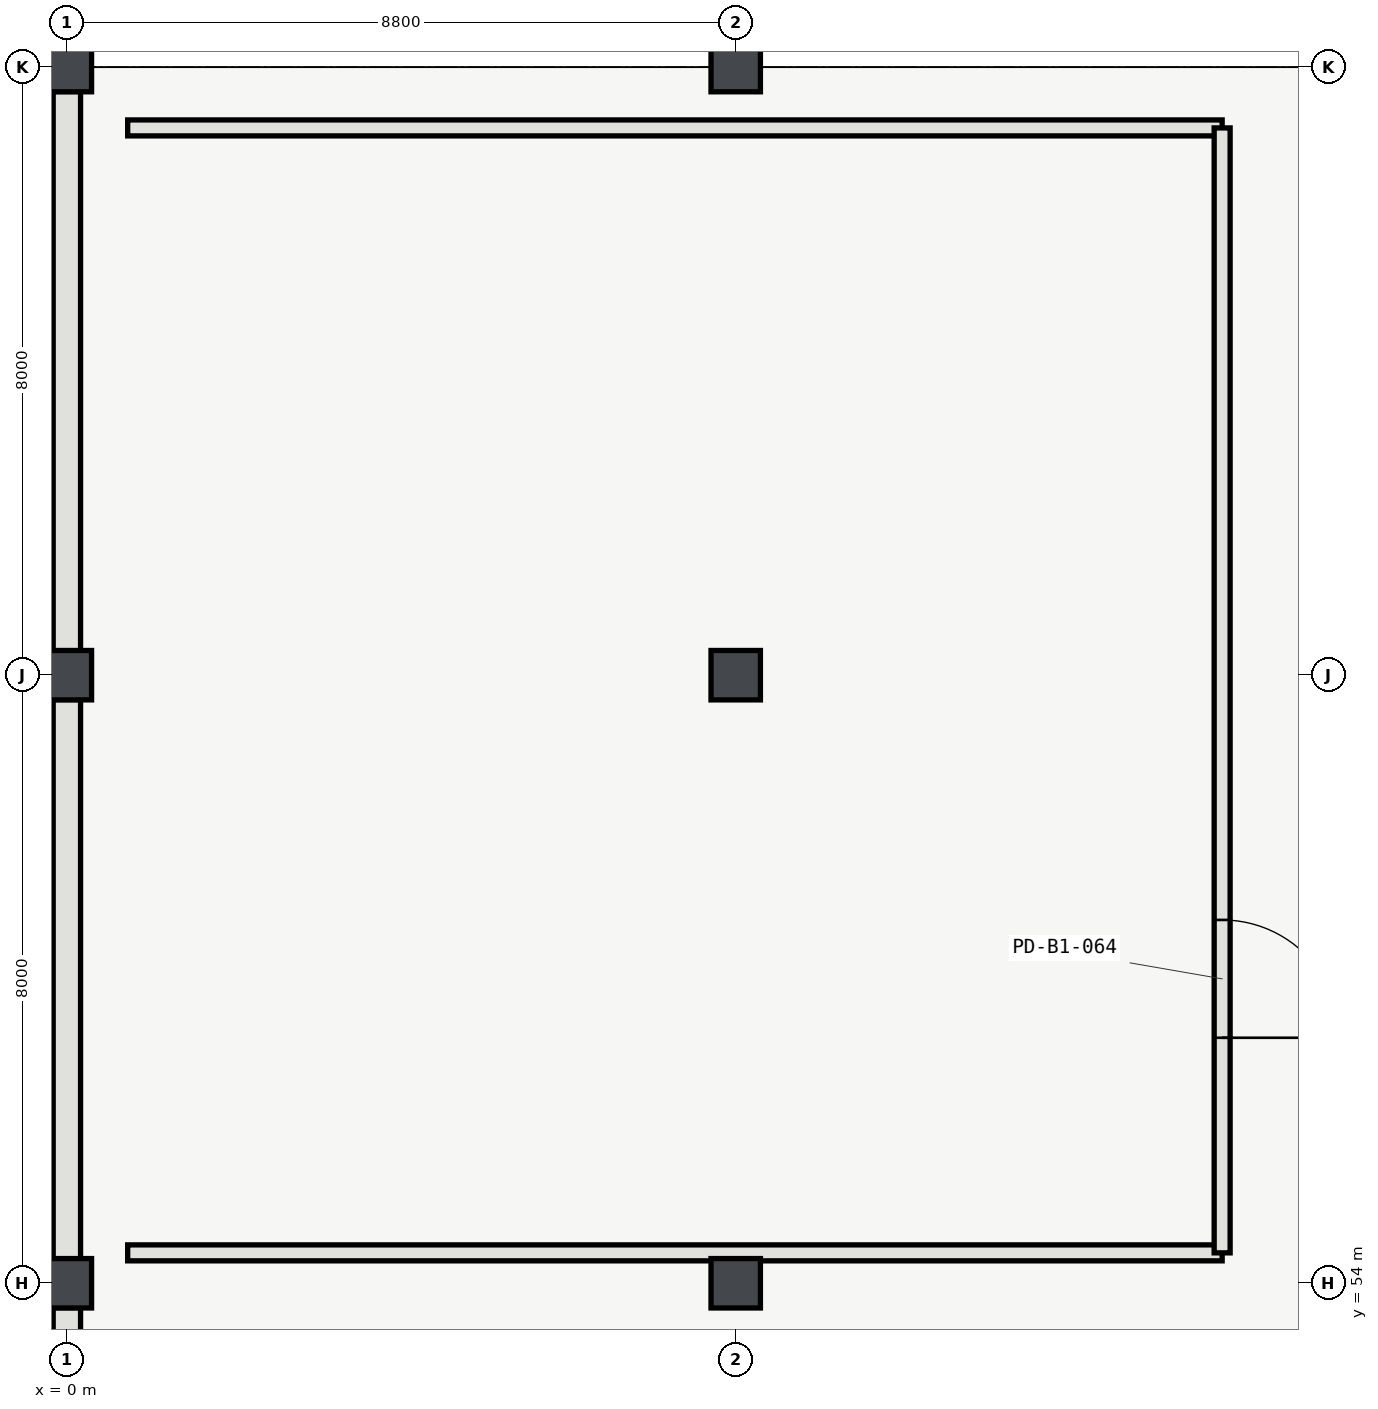
"""IFC4 building model, lengths in metres.
Left out: names, types, materials, properties, quantities, classifications, styles, units other than length and angle.
Written with IfcOpenShell. Run it as: python <this file> out.ifc"""

import sys

from ifc_helpers import new_model, si_unit, direction, frame, frame_2d, origin, origin_2d, place, context, subcontext, project, spatial, rectangle, hollow_rectangle, extrude, element, fill, save


model = new_model("IFC4")
c1 = context("Model", 3, precision=1e-05, world=origin(), true_north=direction((0.0, 1.0)))
c2 = subcontext(c1, "Body", "Model", "MODEL_VIEW")
j1 = project(units=[si_unit("LENGTHUNIT", "METRE"), si_unit("PLANEANGLEUNIT", "RADIAN")], contexts=[c1])
p1 = place(None, origin())
s1 = spatial("IfcSite", under=j1, at=p1, CompositionType="ELEMENT")
p2 = place(p1, origin())
s2 = spatial("IfcBuilding", under=s1, at=p2, CompositionType="ELEMENT")
p3 = place(p2, frame((0.0, 0.0, -4.8)))
s3 = spatial("IfcBuildingStorey", under=s2, at=p3, CompositionType="ELEMENT", Elevation=-4.8)
for number, where, z_axis, x_axis in (
    (1, (0.0, 54.0, 0.0), (0.0, 0.0, 1.0), (1.0, 0.0, 0.0)),
    (2, (0.0, 62.0, 0.0), (0.0, 0.0, 1.0), (1.0, 0.0, 0.0)),
    (3, (0.0, 70.0, 0.0), (0.0, 0.0, 1.0), (1.0, 0.0, 0.0)),
    (4, (8.8, 54.0, 0.0), (0.0, 0.0, 1.0), (1.0, 0.0, 0.0)),
    (5, (8.8, 62.0, 0.0), (0.0, 0.0, 1.0), (1.0, 0.0, 0.0)),
    (6, (8.8, 70.0, 0.0), (0.0, 0.0, 1.0), (1.0, 0.0, 0.0)),
):
    element("IfcColumn", number, at=place(p3, frame(where, z_axis=z_axis, x_axis=x_axis)), inside=s3, PredefinedType="COLUMN", context=c2, shape_type="SweptSolid", body=[
        extrude(hollow_rectangle(XDim=0.65, YDim=0.65, WallThickness=0.026, InnerFilletRadius=0.026, OuterFilletRadius=0.052, at=origin_2d()), origin(), (0.0, 0.0, 1.0), 4.8),
    ])
for number, where, z_axis, x_axis in (
    (7, (0.0, 53.679, 0.0), (0.0, 0.0, 1.0), (0.0, -1.0, 0.0)),
    (8, (0.0, 61.679, 0.0), (0.0, 0.0, 1.0), (0.0, -1.0, 0.0)),
    (9, (0.0, 69.679, 0.0), (0.0, 0.0, 1.0), (0.0, -1.0, 0.0)),
):
    element("IfcWall", number, at=place(p3, frame(where, z_axis=z_axis, x_axis=x_axis)), inside=s3, PredefinedType="USERDEFINED", context=c2, shape_type="SweptSolid", body=[
        extrude(rectangle(XDim=7.358, YDim=0.36, at=frame_2d((3.679, 0.0))), origin(), (0.0, 0.0, 1.0), 3.883),
    ])
for number, where, z_axis, x_axis in (
    (10, (0.8, 54.4, 0.0), (0.0, 0.0, 1.0), (1.0, 0.0, 0.0)),
    (11, (15.2, 69.2, 0.0), (0.0, 0.0, 1.0), (-1.0, 0.0, 0.0)),
):
    element("IfcWall", number, at=place(p3, frame(where, z_axis=z_axis, x_axis=x_axis)), inside=s3, PredefinedType="PARTITIONING", context=c2, shape_type="SweptSolid", body=[
        extrude(rectangle(XDim=14.4, YDim=0.21, at=frame_2d((7.2, 0.0))), origin(), (0.0, 0.0, 1.0), 4.52),
    ])
p4 = place(p3, frame((15.2, 54.4, 0.0), z_axis=(0.0, 0.0, 1.0), x_axis=(0.0, 1.0, 0.0)))
e12 = element("IfcWall", 12, at=p4, inside=s3, PredefinedType="PARTITIONING", context=c2, shape_type="SweptSolid", body=[
    extrude(rectangle(XDim=14.8, YDim=0.21, at=frame_2d((7.4, 0.0))), origin(), (0.0, 0.0, 1.0), 4.52),
])
p5 = place(p4, frame((2.83, 0.0, 0.0)))
e13 = element("IfcOpeningElement", 13, at=p5, cuts=e12, PredefinedType="OPENING", context=c2, shape_type="SweptSolid", body=[
    extrude(rectangle(XDim=1.55, YDim=2.25, at=frame_2d((0.775, 1.125))), frame((0.0, 0.115, 0.0), z_axis=(0.0, -1.0, 0.0), x_axis=(1.0, 0.0, 0.0)), (0.0, 0.0, 1.0), 0.23),
])
p6 = place(p5, origin())
e14 = element("IfcDoor", 14, at=p6, inside=s3, OperationType="DOUBLE_DOOR_SINGLE_SWING", PredefinedType="DOOR", context=c2, shape_type="SweptSolid", body=[
    extrude(rectangle(XDim=1.55, YDim=2.25, at=frame_2d((0.775, 1.125))), frame((0.0, 0.025, 0.0), z_axis=(0.0, -1.0, 0.0), x_axis=(1.0, 0.0, 0.0)), (0.0, 0.0, 1.0), 0.05),
])
fill(e13, e14)
save(model, sys.argv[1])
